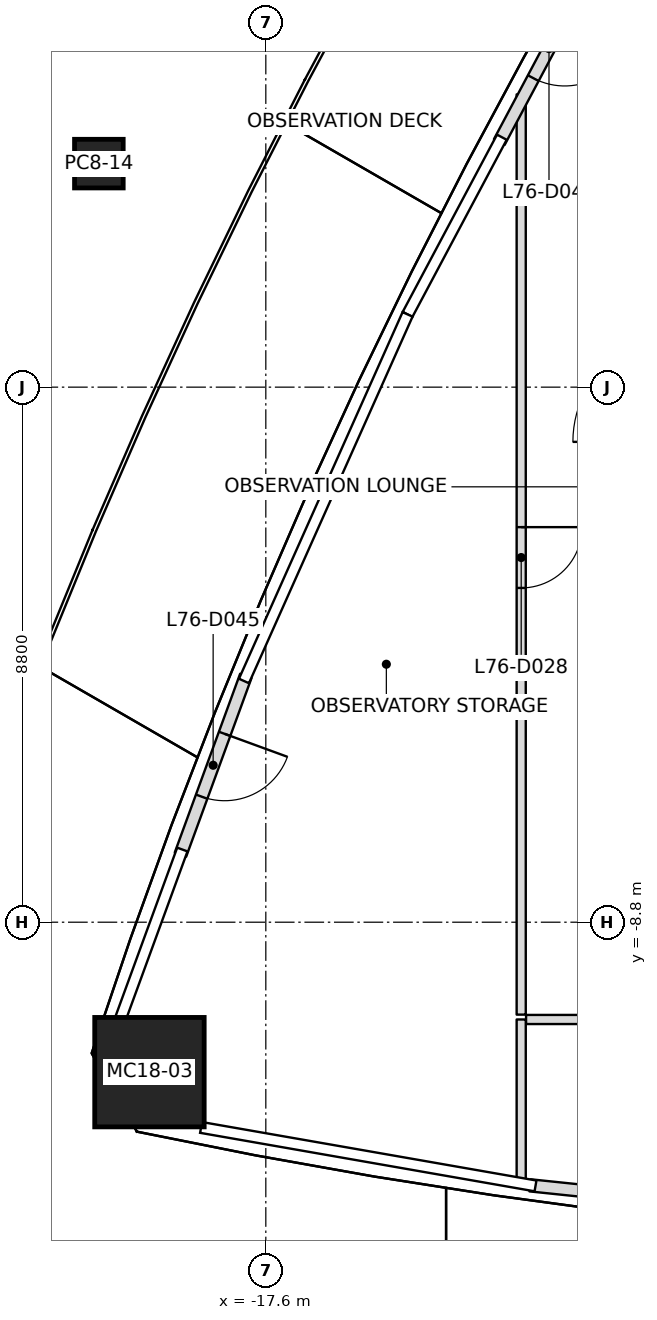
"""IFC4 building model, lengths in metres.
Left out: names, types, materials, properties, quantities, classifications, styles, units other than length and angle.
Written with IfcOpenShell. Run it as: python <this file> out.ifc"""

import sys

from ifc_helpers import new_model, si_unit, direction, frame, frame_2d, origin, origin_2d, place, context, subcontext, project, spatial, rectangle, extrude, clip, halfspace, element, fill, save


model = new_model("IFC4")
c1 = context("Model", 3, precision=1e-05, world=origin(), true_north=direction((0.0, 1.0)))
c2 = subcontext(c1, "Body", "Model", "MODEL_VIEW")
j1 = project(units=[si_unit("LENGTHUNIT", "METRE"), si_unit("PLANEANGLEUNIT", "RADIAN")], contexts=[c1])
p1 = place(None, origin())
s1 = spatial("IfcSite", under=j1, at=p1, CompositionType="ELEMENT")
p2 = place(p1, origin())
s2 = spatial("IfcBuilding", under=s1, at=p2, CompositionType="ELEMENT")
p3 = place(p2, frame((0.0, 0.0, 339.4)))
s3 = spatial("IfcBuildingStorey", under=s2, at=p3, CompositionType="ELEMENT", Elevation=339.4)
p4 = place(p3, frame((-19.514, -11.266, 0.0), z_axis=(0.0, 0.0, 1.0), x_axis=(1.0, 0.0, 0.0)))
e1 = element("IfcColumn", 1, at=p4, inside=s3, PredefinedType="COLUMN", context=c2, shape_type="SweptSolid", body=[
    clip(extrude(rectangle(XDim=1.8, YDim=1.8, at=origin_2d()), origin(), (0.0, 0.0, 1.0), 5.4), halfspace(frame((0.0, 0.0, 0.009)), True)),
])
p5 = place(p3, frame((-20.346, 3.676, 0.0), z_axis=(0.0, 0.0, 1.0), x_axis=(0.438895015251, 0.898538349537, 0.0)))
e2 = element("IfcColumn", 2, at=p5, inside=s3, PredefinedType="COLUMN", context=c2, shape_type="SweptSolid", body=[
    clip(extrude(rectangle(XDim=0.8, YDim=0.8, at=origin_2d()), origin(), (0.0, 0.0, 1.0), 5.4), halfspace(frame((0.0, 0.0, 0.002)), True)),
])
p6 = place(p3, frame((-13.254, -13.128, 0.0), z_axis=(0.0, 0.0, 1.0), x_axis=(0.99460605578, -0.103724605592, 0.0)))
e3 = element("IfcWall", 3, at=p6, inside=s3, PredefinedType="SOLIDWALL", context=c2, shape_type="SweptSolid", body=[
    extrude(rectangle(XDim=3.481, YDim=0.2, at=frame_2d((1.741, 0.0))), origin(), (0.0, 0.0, 1.0), 4.533),
])
p7 = place(p6, frame((1.19, 0.0, 0.0)))
e4 = element("IfcOpeningElement", 4, at=p7, cuts=e3, PredefinedType="OPENING", context=c2, shape_type="SweptSolid", body=[
    extrude(rectangle(XDim=1.1, YDim=2.1, at=frame_2d((0.55, 1.05))), frame((0.0, 0.1, 0.0), z_axis=(0.0, -1.0, 0.0), x_axis=(1.0, 0.0, 0.0)), (0.0, 0.0, 1.0), 0.2),
])
p8 = place(p3, frame((-12.125, 7.104, 0.0), z_axis=(0.0, 0.0, 1.0), x_axis=(-0.469681595123, -0.882835884637, 0.0)))
e5 = element("IfcWall", 5, at=p8, inside=s3, PredefinedType="SOLIDWALL", context=c2, shape_type="SweptSolid", body=[
    extrude(rectangle(XDim=3.481, YDim=0.2, at=frame_2d((1.741, 0.0))), origin(), (0.0, 0.0, 1.0), 4.533),
])
p9 = place(p8, frame((1.19, 0.0, 0.0)))
e6 = element("IfcOpeningElement", 6, at=p9, cuts=e5, PredefinedType="OPENING", context=c2, shape_type="SweptSolid", body=[
    extrude(rectangle(XDim=1.1, YDim=2.1, at=frame_2d((0.55, 1.05))), frame((0.0, 0.1, 0.0), z_axis=(0.0, -1.0, 0.0), x_axis=(1.0, 0.0, 0.0)), (0.0, 0.0, 1.0), 0.2),
])
p10 = place(p3, frame((-17.929, -4.748, 0.0), z_axis=(0.0, 0.0, 1.0), x_axis=(-0.343345057172, -0.939209333277, 0.0)))
e7 = element("IfcWall", 7, at=p10, inside=s3, PredefinedType="SOLIDWALL", context=c2, shape_type="SweptSolid", body=[
    extrude(rectangle(XDim=3.132, YDim=0.2, at=frame_2d((1.566, 0.0))), origin(), (0.0, 0.0, 1.0), 4.64),
])
p11 = place(p10, frame((1.016, 0.0, 0.0)))
e8 = element("IfcOpeningElement", 8, at=p11, cuts=e7, PredefinedType="OPENING", context=c2, shape_type="SweptSolid", body=[
    extrude(rectangle(XDim=1.1, YDim=2.1, at=frame_2d((0.55, 1.05))), frame((0.0, 0.1, 0.0), z_axis=(0.0, -1.0, 0.0), x_axis=(1.0, 0.0, 0.0)), (0.0, 0.0, 1.0), 0.2),
])
p12 = place(p3, frame((-13.4, -10.4, 0.0), z_axis=(0.0, 0.0, 1.0), x_axis=(0.0, -1.0, 0.0)))
e9 = element("IfcWall", 9, at=p12, inside=s3, PredefinedType="PARTITIONING", context=c2, shape_type="SweptSolid", body=[
    extrude(rectangle(XDim=2.701, YDim=0.15, at=frame_2d((1.35, 0.0))), origin(), (0.0, 0.0, 1.0), 4.75),
])
p13 = place(p3, frame((-13.4, 4.815, 0.0), z_axis=(0.0, 0.0, 1.0), x_axis=(0.0, -1.0, 0.0)))
e10 = element("IfcWall", 10, at=p13, inside=s3, PredefinedType="PARTITIONING", context=c2, shape_type="SweptSolid", body=[
    extrude(rectangle(XDim=15.135, YDim=0.15, at=frame_2d((7.568, 0.0))), origin(), (0.0, 0.0, 1.0), 4.533),
])
p14 = place(p13, frame((7.117, 0.0, 0.0)))
e11 = element("IfcOpeningElement", 11, at=p14, cuts=e10, PredefinedType="OPENING", context=c2, shape_type="SweptSolid", body=[
    extrude(rectangle(XDim=1.0, YDim=2.1, at=frame_2d((0.5, 1.05))), frame((0.0, 0.075, 0.0), z_axis=(0.0, -1.0, 0.0), x_axis=(1.0, 0.0, 0.0)), (0.0, 0.0, 1.0), 0.15),
])
p15 = place(p3, frame((-13.32, -10.4, 0.0), z_axis=(0.0, 0.0, 1.0), x_axis=(1.0, 0.0, 0.0)))
e12 = element("IfcWall", 12, at=p15, inside=s3, PredefinedType="PARTITIONING", context=c2, shape_type="SweptSolid", body=[
    extrude(rectangle(XDim=26.72, YDim=0.15, at=frame_2d((13.36, 0.0))), origin(), (0.0, 0.0, 1.0), 4.533),
])
p16 = place(p15, frame((4.32, 0.0, 0.0)))
e13 = element("IfcOpeningElement", 13, at=p16, cuts=e12, PredefinedType="OPENING", context=c2, shape_type="SweptSolid", body=[
    extrude(rectangle(XDim=1.0, YDim=2.1, at=frame_2d((0.5, 1.05))), frame((0.0, 0.075, 0.0), z_axis=(0.0, -1.0, 0.0), x_axis=(1.0, 0.0, 0.0)), (0.0, 0.0, 1.0), 0.15),
])
p17 = place(p15, frame((13.22, 0.0, 0.0)))
e14 = element("IfcOpeningElement", 14, at=p17, cuts=e12, PredefinedType="OPENING", context=c2, shape_type="SweptSolid", body=[
    extrude(rectangle(XDim=1.0, YDim=2.1, at=frame_2d((0.5, 1.05))), frame((0.0, 0.075, 0.0), z_axis=(0.0, -1.0, 0.0), x_axis=(1.0, 0.0, 0.0)), (0.0, 0.0, 1.0), 0.15),
])
p18 = place(p15, frame((21.72, 0.0, 0.0)))
e15 = element("IfcOpeningElement", 15, at=p18, cuts=e12, PredefinedType="OPENING", context=c2, shape_type="SweptSolid", body=[
    extrude(rectangle(XDim=1.0, YDim=2.1, at=frame_2d((0.5, 1.05))), frame((0.0, 0.075, 0.0), z_axis=(0.0, -1.0, 0.0), x_axis=(1.0, 0.0, 0.0)), (0.0, 0.0, 1.0), 0.15),
])
p19 = place(p9, origin())
e16 = element("IfcDoor", 16, at=p19, inside=s3, OperationType="SINGLE_SWING_RIGHT", PredefinedType="DOOR", context=c2, shape_type="SweptSolid", body=[
    extrude(rectangle(XDim=1.1, YDim=2.1, at=frame_2d((0.55, 1.05))), frame((0.0, 0.025, 0.0), z_axis=(0.0, -1.0, 0.0), x_axis=(1.0, 0.0, 0.0)), (0.0, 0.0, 1.0), 0.05),
])
fill(e6, e16)
p20 = place(p11, origin())
e17 = element("IfcDoor", 17, at=p20, inside=s3, OperationType="SINGLE_SWING_RIGHT", PredefinedType="DOOR", context=c2, shape_type="SweptSolid", body=[
    extrude(rectangle(XDim=1.1, YDim=2.1, at=frame_2d((0.55, 1.05))), frame((0.0, 0.025, 0.0), z_axis=(0.0, -1.0, 0.0), x_axis=(1.0, 0.0, 0.0)), (0.0, 0.0, 1.0), 0.05),
])
fill(e8, e17)
p21 = place(p14, origin())
e18 = element("IfcDoor", 18, at=p21, inside=s3, OperationType="SINGLE_SWING_RIGHT", PredefinedType="DOOR", context=c2, shape_type="SweptSolid", body=[
    extrude(rectangle(XDim=1.0, YDim=2.1, at=frame_2d((0.5, 1.05))), frame((0.0, 0.025, 0.0), z_axis=(0.0, -1.0, 0.0), x_axis=(1.0, 0.0, 0.0)), (0.0, 0.0, 1.0), 0.05),
])
fill(e11, e18)
save(model, sys.argv[1])
